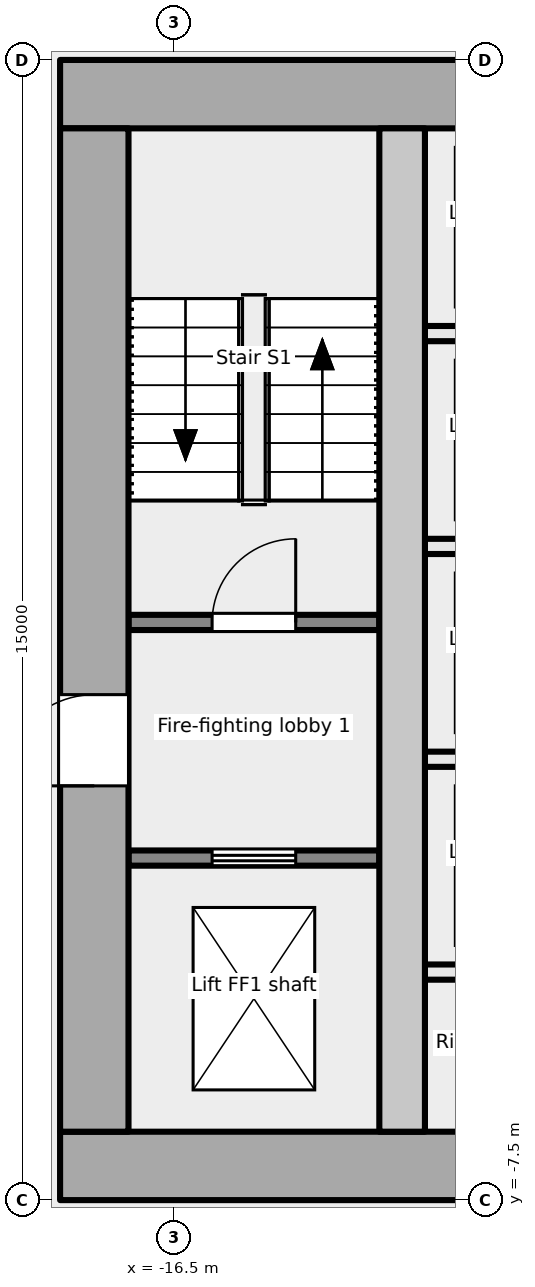
"""IFC4 building model, lengths in metres.
Left out: names, types, materials, properties, quantities, classifications, styles, units other than length and angle.
Written with IfcOpenShell. Run it as: python <this file> out.ifc"""

import sys

from ifc_helpers import new_model, si_unit, direction, frame, frame_2d, origin, place, context, subcontext, project, spatial, rectangle, extrude, element, fill, save


model = new_model("IFC4")
c1 = context("Model", 3, precision=1e-05, world=origin(), true_north=direction((0.0, 1.0)))
c2 = subcontext(c1, "Body", "Model", "MODEL_VIEW")
j1 = project(units=[si_unit("LENGTHUNIT", "METRE"), si_unit("PLANEANGLEUNIT", "RADIAN")], contexts=[c1])
p1 = place(None, origin())
s1 = spatial("IfcSite", under=j1, at=p1, CompositionType="ELEMENT")
p2 = place(p1, origin())
s2 = spatial("IfcBuilding", under=s1, at=p2, CompositionType="ELEMENT")
p3 = place(p2, frame((0.0, 0.0, 27.0)))
s3 = spatial("IfcBuildingStorey", under=s2, at=p3, CompositionType="ELEMENT", Elevation=27.0)
p4 = place(p3, frame((-18.0, -7.05, -0.2), z_axis=(0.0, 0.0, 1.0), x_axis=(1.0, 0.0, 0.0)))
e1 = element("IfcWall", 1, at=p4, inside=s3, PredefinedType="SHEAR", context=c2, shape_type="SweptSolid", body=[
    extrude(rectangle(XDim=36.0, YDim=0.9, at=frame_2d((18.0, 0.0))), origin(), (0.0, 0.0, 1.0), 5.4),
])
p5 = place(p4, frame((7.8, 0.0, 0.2)))
e2 = element("IfcOpeningElement", 2, at=p5, cuts=e1, PredefinedType="OPENING", context=c2, shape_type="SweptSolid", body=[
    extrude(rectangle(XDim=2.4, YDim=2.1, at=frame_2d((1.2, 1.05))), frame((0.0, 0.46, 0.0), z_axis=(0.0, -1.0, 0.0), x_axis=(1.0, 0.0, 0.0)), (0.0, 0.0, 1.0), 0.921),
])
p6 = place(p4, frame((17.4, 0.0, 0.2)))
e3 = element("IfcOpeningElement", 3, at=p6, cuts=e1, PredefinedType="OPENING", context=c2, shape_type="SweptSolid", body=[
    extrude(rectangle(XDim=1.2, YDim=2.1, at=frame_2d((0.6, 1.05))), frame((0.0, 0.46, 0.0), z_axis=(0.0, -1.0, 0.0), x_axis=(1.0, 0.0, 0.0)), (0.0, 0.0, 1.0), 0.921),
])
p7 = place(p4, frame((26.1, 0.0, 0.2)))
e4 = element("IfcOpeningElement", 4, at=p7, cuts=e1, PredefinedType="OPENING", context=c2, shape_type="SweptSolid", body=[
    extrude(rectangle(XDim=2.4, YDim=2.1, at=frame_2d((1.2, 1.05))), frame((0.0, 0.46, 0.0), z_axis=(0.0, -1.0, 0.0), x_axis=(1.0, 0.0, 0.0)), (0.0, 0.0, 1.0), 0.921),
])
p8 = place(p3, frame((-18.0, 7.05, -0.2), z_axis=(0.0, 0.0, 1.0), x_axis=(1.0, 0.0, 0.0)))
e5 = element("IfcWall", 5, at=p8, inside=s3, PredefinedType="SHEAR", context=c2, shape_type="SweptSolid", body=[
    extrude(rectangle(XDim=36.0, YDim=0.9, at=frame_2d((18.0, 0.0))), origin(), (0.0, 0.0, 1.0), 5.4),
])
p9 = place(p3, frame((-17.55, -6.6, -0.2), z_axis=(0.0, 0.0, 1.0), x_axis=(0.0, 1.0, 0.0)))
e6 = element("IfcWall", 6, at=p9, inside=s3, PredefinedType="SHEAR", context=c2, shape_type="SweptSolid", body=[
    extrude(rectangle(XDim=13.2, YDim=0.9, at=frame_2d((6.6, 0.0))), origin(), (0.0, 0.0, 1.0), 5.4),
])
p10 = place(p9, frame((4.55, 0.0, 0.2)))
e7 = element("IfcOpeningElement", 7, at=p10, cuts=e6, PredefinedType="OPENING", context=c2, shape_type="SweptSolid", body=[
    extrude(rectangle(XDim=1.2, YDim=2.1, at=frame_2d((0.6, 1.05))), frame((0.0, 0.46, 0.0), z_axis=(0.0, -1.0, 0.0), x_axis=(1.0, 0.0, 0.0)), (0.0, 0.0, 1.0), 0.921),
])
p11 = place(p3, frame((-13.5, -6.6, -0.2), z_axis=(0.0, 0.0, 1.0), x_axis=(0.0, 1.0, 0.0)))
e8 = element("IfcWall", 8, at=p11, inside=s3, PredefinedType="SHEAR", context=c2, shape_type="SweptSolid", body=[
    extrude(rectangle(XDim=13.2, YDim=0.6, at=frame_2d((6.6, 0.0))), origin(), (0.0, 0.0, 1.0), 5.4),
])
p12 = place(p3, frame((-17.1, -3.0, 0.0), z_axis=(0.0, 0.0, 1.0), x_axis=(1.0, 0.0, 0.0)))
e9 = element("IfcWall", 9, at=p12, inside=s3, PredefinedType="PARTITIONING", context=c2, shape_type="SweptSolid", body=[
    extrude(rectangle(XDim=3.3, YDim=0.2, at=frame_2d((1.65, 0.0))), origin(), (0.0, 0.0, 1.0), 5.2),
])
p13 = place(p12, frame((1.1, 0.0, 0.0)))
e10 = element("IfcOpeningElement", 10, at=p13, cuts=e9, PredefinedType="OPENING", context=c2, shape_type="SweptSolid", body=[
    extrude(rectangle(XDim=1.1, YDim=2.1, at=frame_2d((0.55, 1.05))), frame((0.0, 0.111, 0.0), z_axis=(0.0, -1.0, 0.0), x_axis=(1.0, 0.0, 0.0)), (0.0, 0.0, 1.0), 0.221),
])
p14 = place(p3, frame((-17.1, 0.1, 0.0), z_axis=(0.0, 0.0, 1.0), x_axis=(1.0, 0.0, 0.0)))
e11 = element("IfcWall", 11, at=p14, inside=s3, PredefinedType="PARTITIONING", context=c2, shape_type="SweptSolid", body=[
    extrude(rectangle(XDim=3.3, YDim=0.2, at=frame_2d((1.65, 0.0))), origin(), (0.0, 0.0, 1.0), 5.2),
])
p15 = place(p14, frame((1.1, 0.0, 0.0)))
e12 = element("IfcOpeningElement", 12, at=p15, cuts=e11, PredefinedType="OPENING", context=c2, shape_type="SweptSolid", body=[
    extrude(rectangle(XDim=1.1, YDim=2.1, at=frame_2d((0.55, 1.05))), frame((0.0, 0.111, 0.0), z_axis=(0.0, -1.0, 0.0), x_axis=(1.0, 0.0, 0.0)), (0.0, 0.0, 1.0), 0.221),
])
for number, where, z_axis, x_axis in (
    (13, (-13.2, -1.7, 0.0), (0.0, 0.0, 1.0), (1.0, 0.0, 0.0)),
    (14, (-13.2, 1.1, 0.0), (0.0, 0.0, 1.0), (1.0, 0.0, 0.0)),
    (15, (-13.2, 3.9, 0.0), (0.0, 0.0, 1.0), (1.0, 0.0, 0.0)),
    (16, (-13.2, -4.5, 0.0), (0.0, 0.0, 1.0), (1.0, 0.0, 0.0)),
):
    element("IfcWall", number, at=place(p3, frame(where, z_axis=z_axis, x_axis=x_axis)), inside=s3, PredefinedType="PARTITIONING", context=c2, shape_type="SweptSolid", body=[
        extrude(rectangle(XDim=2.3, YDim=0.2, at=frame_2d((1.15, 0.0))), origin(), (0.0, 0.0, 1.0), 5.2),
    ])
p16 = place(p13, origin())
e17 = element("IfcDoor", 17, at=p16, inside=s3, OperationType="DOUBLE_DOOR_SLIDING", PredefinedType="DOOR", context=c2, shape_type="SweptSolid", body=[
    extrude(rectangle(XDim=1.1, YDim=2.1, at=frame_2d((0.55, 1.05))), frame((0.0, 0.025, 0.0), z_axis=(0.0, -1.0, 0.0), x_axis=(1.0, 0.0, 0.0)), (0.0, 0.0, 1.0), 0.05),
])
fill(e10, e17)
p17 = place(p10, origin())
e18 = element("IfcDoor", 18, at=p17, inside=s3, OperationType="SINGLE_SWING_LEFT", PredefinedType="DOOR", context=c2, shape_type="SweptSolid", body=[
    extrude(rectangle(XDim=1.2, YDim=2.1, at=frame_2d((0.6, 1.05))), frame((0.0, 0.025, 0.0), z_axis=(0.0, -1.0, 0.0), x_axis=(1.0, 0.0, 0.0)), (0.0, 0.0, 1.0), 0.05),
])
fill(e7, e18)
p18 = place(p15, origin())
e19 = element("IfcDoor", 19, at=p18, inside=s3, OperationType="SINGLE_SWING_RIGHT", PredefinedType="DOOR", context=c2, shape_type="SweptSolid", body=[
    extrude(rectangle(XDim=1.1, YDim=2.1, at=frame_2d((0.55, 1.05))), frame((0.0, 0.025, 0.0), z_axis=(0.0, -1.0, 0.0), x_axis=(1.0, 0.0, 0.0)), (0.0, 0.0, 1.0), 0.05),
])
fill(e12, e19)
save(model, sys.argv[1])
